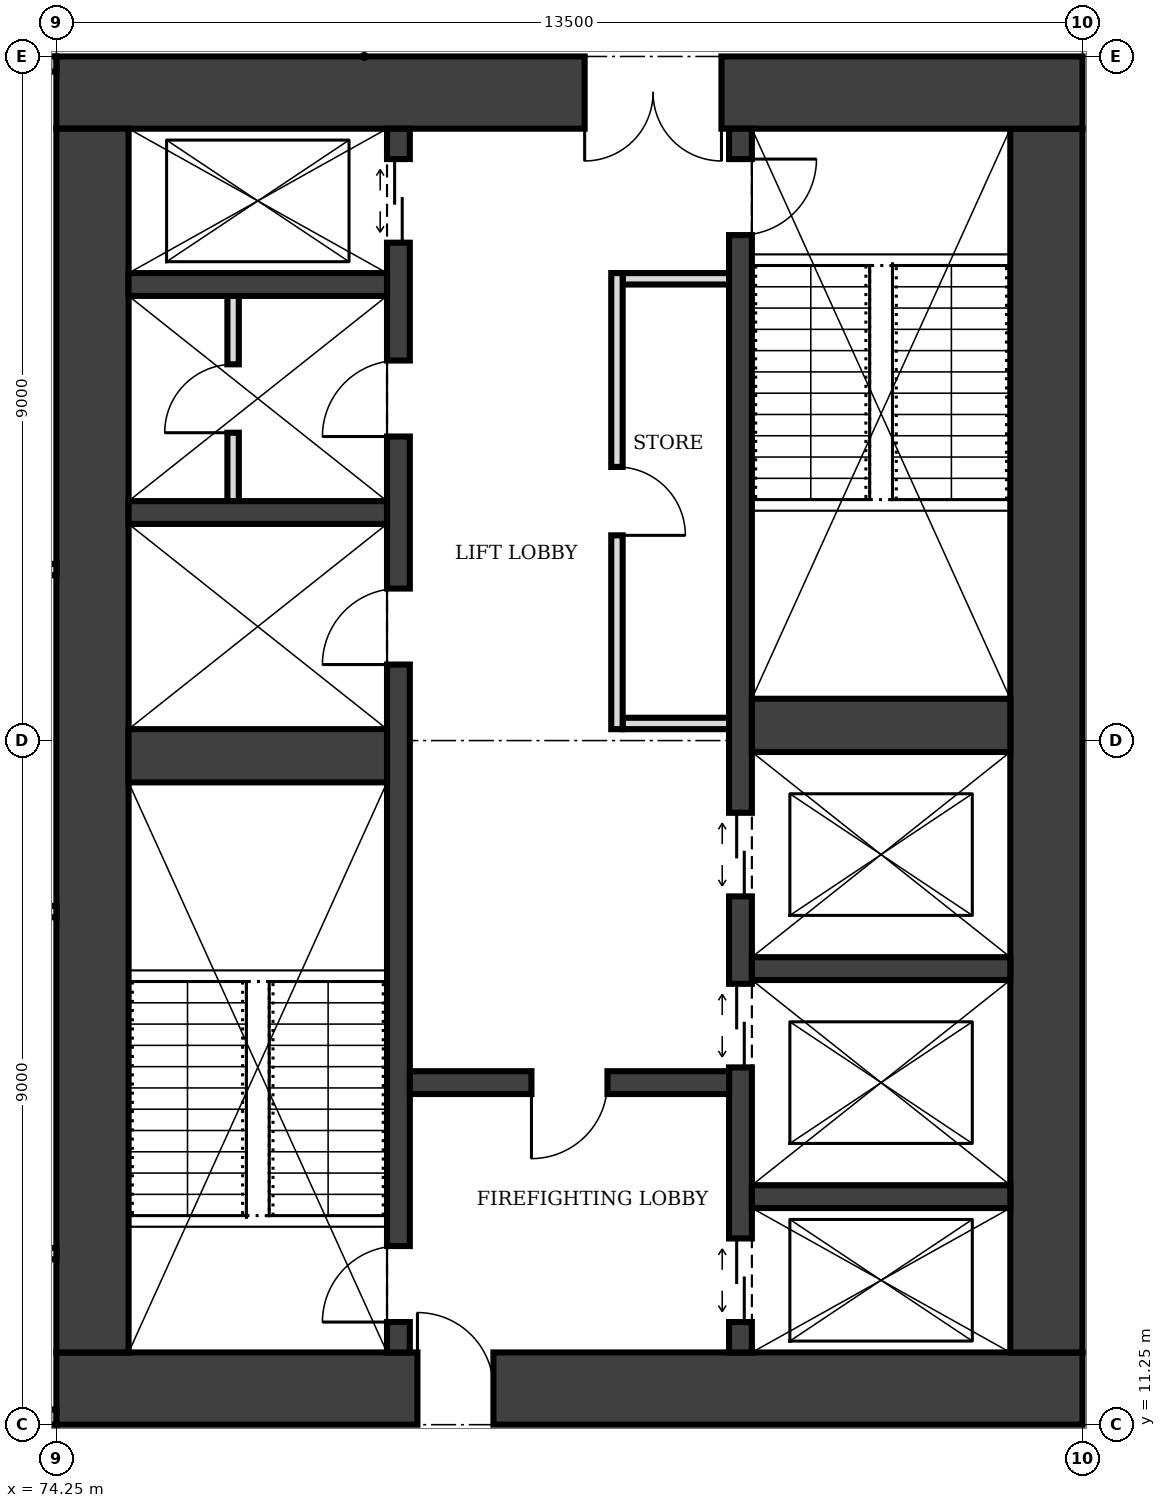
"""IFC4 building model, lengths in metres.
Left out: names, types, materials, properties, quantities, classifications, styles, units other than length and angle.
Written with IfcOpenShell. Run it as: python <this file> out.ifc"""

import sys

from ifc_helpers import new_model, si_unit, direction, frame, frame_2d, origin, place, context, subcontext, project, spatial, rectangle, extrude, element, fill, save


model = new_model("IFC4")
c1 = context("Model", 3, precision=1e-05, world=origin(), true_north=direction((0.0, 1.0)))
c2 = subcontext(c1, "Body", "Model", "MODEL_VIEW")
j1 = project(units=[si_unit("LENGTHUNIT", "METRE"), si_unit("PLANEANGLEUNIT", "RADIAN")], contexts=[c1])
p1 = place(None, origin())
s1 = spatial("IfcSite", under=j1, at=p1, CompositionType="ELEMENT")
p2 = place(p1, origin())
s2 = spatial("IfcBuilding", under=s1, at=p2, CompositionType="ELEMENT")
p3 = place(p2, frame((0.0, 0.0, 157.0)))
s3 = spatial("IfcBuildingStorey", under=s2, at=p3, CompositionType="ELEMENT", Elevation=157.0)
p4 = place(p3, frame((74.25, 11.725, 0.0), z_axis=(0.0, 0.0, 1.0), x_axis=(1.0, 0.0, 0.0)))
e1 = element("IfcWall", 1, at=p4, inside=s3, PredefinedType="SHEAR", context=c2, shape_type="SweptSolid", body=[
    extrude(rectangle(XDim=13.5, YDim=0.95, at=frame_2d((6.75, 0.0))), origin(), (0.0, 0.0, 1.0), 4.0),
])
p5 = place(p4, frame((4.75, 0.0, 0.0)))
e2 = element("IfcOpeningElement", 2, at=p5, cuts=e1, PredefinedType="OPENING", context=c2, shape_type="SweptSolid", body=[
    extrude(rectangle(XDim=1.0, YDim=2.1, at=frame_2d((0.5, 1.05))), frame((0.0, 0.485, 0.0), z_axis=(0.0, -1.0, 0.0), x_axis=(1.0, 0.0, 0.0)), (0.0, 0.0, 1.0), 0.97),
])
p6 = place(p3, frame((87.275, 12.2, 0.0), z_axis=(0.0, 0.0, 1.0), x_axis=(0.0, 1.0, 0.0)))
e3 = element("IfcWall", 3, at=p6, inside=s3, PredefinedType="SHEAR", context=c2, shape_type="SweptSolid", body=[
    extrude(rectangle(XDim=16.1, YDim=0.95, at=frame_2d((8.05, 0.0))), origin(), (0.0, 0.0, 1.0), 4.0),
])
p7 = place(p3, frame((87.75, 28.775, 0.0), z_axis=(0.0, 0.0, 1.0), x_axis=(-1.0, 0.0, 0.0)))
e4 = element("IfcWall", 4, at=p7, inside=s3, PredefinedType="SHEAR", context=c2, shape_type="SweptSolid", body=[
    extrude(rectangle(XDim=13.5, YDim=0.95, at=frame_2d((6.75, 0.0))), origin(), (0.0, 0.0, 1.0), 4.0),
])
p8 = place(p7, frame((4.75, 0.0, 0.0)))
e5 = element("IfcOpeningElement", 5, at=p8, cuts=e4, PredefinedType="OPENING", context=c2, shape_type="SweptSolid", body=[
    extrude(rectangle(XDim=1.8, YDim=2.1, at=frame_2d((0.9, 1.05))), frame((0.0, 0.485, 0.0), z_axis=(0.0, -1.0, 0.0), x_axis=(1.0, 0.0, 0.0)), (0.0, 0.0, 1.0), 0.97),
])
p9 = place(p3, frame((74.725, 28.3, 0.0), z_axis=(0.0, 0.0, 1.0), x_axis=(0.0, -1.0, 0.0)))
e6 = element("IfcWall", 6, at=p9, inside=s3, PredefinedType="SHEAR", context=c2, shape_type="SweptSolid", body=[
    extrude(rectangle(XDim=16.1, YDim=0.95, at=frame_2d((8.05, 0.0))), origin(), (0.0, 0.0, 1.0), 4.0),
])
p10 = place(p3, frame((78.75, 12.2, 0.0), z_axis=(0.0, 0.0, 1.0), x_axis=(0.0, 1.0, 0.0)))
e7 = element("IfcWall", 7, at=p10, inside=s3, PredefinedType="SHEAR", context=c2, shape_type="SweptSolid", body=[
    extrude(rectangle(XDim=16.1, YDim=0.3, at=frame_2d((8.05, 0.0))), origin(), (0.0, 0.0, 1.0), 4.0),
])
p11 = place(p10, frame((0.4, 0.0, 0.0)))
e8 = element("IfcOpeningElement", 8, at=p11, cuts=e7, PredefinedType="OPENING", context=c2, shape_type="SweptSolid", body=[
    extrude(rectangle(XDim=1.0, YDim=2.1, at=frame_2d((0.5, 1.05))), frame((0.0, 0.16, 0.0), z_axis=(0.0, -1.0, 0.0), x_axis=(1.0, 0.0, 0.0)), (0.0, 0.0, 1.0), 0.32),
])
p12 = place(p10, frame((14.6, 0.0, 0.0)))
e9 = element("IfcOpeningElement", 9, at=p12, cuts=e7, PredefinedType="OPENING", context=c2, shape_type="SweptSolid", body=[
    extrude(rectangle(XDim=1.1, YDim=2.1, at=frame_2d((0.55, 1.05))), frame((0.0, 0.16, 0.0), z_axis=(0.0, -1.0, 0.0), x_axis=(1.0, 0.0, 0.0)), (0.0, 0.0, 1.0), 0.32),
])
p13 = place(p10, frame((9.05, 0.0, 0.0)))
e10 = element("IfcOpeningElement", 10, at=p13, cuts=e7, PredefinedType="OPENING", context=c2, shape_type="SweptSolid", body=[
    extrude(rectangle(XDim=1.0, YDim=2.1, at=frame_2d((0.5, 1.05))), frame((0.0, 0.16, 0.0), z_axis=(0.0, -1.0, 0.0), x_axis=(1.0, 0.0, 0.0)), (0.0, 0.0, 1.0), 0.32),
])
p14 = place(p10, frame((12.05, 0.0, 0.0)))
e11 = element("IfcOpeningElement", 11, at=p14, cuts=e7, PredefinedType="OPENING", context=c2, shape_type="SweptSolid", body=[
    extrude(rectangle(XDim=1.0, YDim=2.1, at=frame_2d((0.5, 1.05))), frame((0.0, 0.16, 0.0), z_axis=(0.0, -1.0, 0.0), x_axis=(1.0, 0.0, 0.0)), (0.0, 0.0, 1.0), 0.32),
])
p15 = place(p3, frame((83.25, 12.2, 0.0), z_axis=(0.0, 0.0, 1.0), x_axis=(0.0, 1.0, 0.0)))
e12 = element("IfcWall", 12, at=p15, inside=s3, PredefinedType="SHEAR", context=c2, shape_type="SweptSolid", body=[
    extrude(rectangle(XDim=16.1, YDim=0.3, at=frame_2d((8.05, 0.0))), origin(), (0.0, 0.0, 1.0), 4.0),
])
p16 = place(p15, frame((14.7, 0.0, 0.0)))
e13 = element("IfcOpeningElement", 13, at=p16, cuts=e12, PredefinedType="OPENING", context=c2, shape_type="SweptSolid", body=[
    extrude(rectangle(XDim=1.0, YDim=2.1, at=frame_2d((0.5, 1.05))), frame((0.0, 0.16, 0.0), z_axis=(0.0, -1.0, 0.0), x_axis=(1.0, 0.0, 0.0)), (0.0, 0.0, 1.0), 0.32),
])
p17 = place(p15, frame((0.4, 0.0, 0.0)))
e14 = element("IfcOpeningElement", 14, at=p17, cuts=e12, PredefinedType="OPENING", context=c2, shape_type="SweptSolid", body=[
    extrude(rectangle(XDim=1.1, YDim=2.1, at=frame_2d((0.55, 1.05))), frame((0.0, 0.16, 0.0), z_axis=(0.0, -1.0, 0.0), x_axis=(1.0, 0.0, 0.0)), (0.0, 0.0, 1.0), 0.32),
])
p18 = place(p15, frame((3.75, 0.0, 0.0)))
e15 = element("IfcOpeningElement", 15, at=p18, cuts=e12, PredefinedType="OPENING", context=c2, shape_type="SweptSolid", body=[
    extrude(rectangle(XDim=1.1, YDim=2.1, at=frame_2d((0.55, 1.05))), frame((0.0, 0.16, 0.0), z_axis=(0.0, -1.0, 0.0), x_axis=(1.0, 0.0, 0.0)), (0.0, 0.0, 1.0), 0.32),
])
p19 = place(p15, frame((6.0, 0.0, 0.0)))
e16 = element("IfcOpeningElement", 16, at=p19, cuts=e12, PredefinedType="OPENING", context=c2, shape_type="SweptSolid", body=[
    extrude(rectangle(XDim=1.1, YDim=2.1, at=frame_2d((0.55, 1.05))), frame((0.0, 0.16, 0.0), z_axis=(0.0, -1.0, 0.0), x_axis=(1.0, 0.0, 0.0)), (0.0, 0.0, 1.0), 0.32),
])
p20 = place(p3, frame((75.2, 20.05, 0.0), z_axis=(0.0, 0.0, 1.0), x_axis=(1.0, 0.0, 0.0)))
e17 = element("IfcWall", 17, at=p20, inside=s3, PredefinedType="SHEAR", context=c2, shape_type="SweptSolid", body=[
    extrude(rectangle(XDim=3.4, YDim=0.7, at=frame_2d((1.7, 0.0))), origin(), (0.0, 0.0, 1.0), 4.0),
])
p21 = place(p3, frame((78.9, 15.75, 0.0), z_axis=(0.0, 0.0, 1.0), x_axis=(1.0, 0.0, 0.0)))
e18 = element("IfcWall", 18, at=p21, inside=s3, PredefinedType="SHEAR", context=c2, shape_type="SweptSolid", body=[
    extrude(rectangle(XDim=4.2, YDim=0.3, at=frame_2d((2.1, 0.0))), origin(), (0.0, 0.0, 1.0), 4.0),
])
p22 = place(p21, frame((1.6, 0.0, 0.0)))
e19 = element("IfcOpeningElement", 19, at=p22, cuts=e18, PredefinedType="OPENING", context=c2, shape_type="SweptSolid", body=[
    extrude(rectangle(XDim=1.0, YDim=2.1, at=frame_2d((0.5, 1.05))), frame((0.0, 0.16, 0.0), z_axis=(0.0, -1.0, 0.0), x_axis=(1.0, 0.0, 0.0)), (0.0, 0.0, 1.0), 0.32),
])
for number, where, z_axis, x_axis in (
    (20, (83.4, 14.25, 0.0), (0.0, 0.0, 1.0), (1.0, 0.0, 0.0)),
    (21, (83.4, 17.25, 0.0), (0.0, 0.0, 1.0), (1.0, 0.0, 0.0)),
):
    element("IfcWall", number, at=place(p3, frame(where, z_axis=z_axis, x_axis=x_axis)), inside=s3, PredefinedType="SHEAR", context=c2, shape_type="SweptSolid", body=[
        extrude(rectangle(XDim=3.4, YDim=0.3, at=frame_2d((1.7, 0.0))), origin(), (0.0, 0.0, 1.0), 4.0),
    ])
p23 = place(p3, frame((83.4, 20.45, 0.0), z_axis=(0.0, 0.0, 1.0), x_axis=(1.0, 0.0, 0.0)))
e22 = element("IfcWall", 22, at=p23, inside=s3, PredefinedType="SHEAR", context=c2, shape_type="SweptSolid", body=[
    extrude(rectangle(XDim=3.4, YDim=0.7, at=frame_2d((1.7, 0.0))), origin(), (0.0, 0.0, 1.0), 4.0),
])
for number, where, z_axis, x_axis in (
    (23, (75.2, 23.25, 0.0), (0.0, 0.0, 1.0), (1.0, 0.0, 0.0)),
    (24, (75.2, 26.25, 0.0), (0.0, 0.0, 1.0), (1.0, 0.0, 0.0)),
):
    element("IfcWall", number, at=place(p3, frame(where, z_axis=z_axis, x_axis=x_axis)), inside=s3, PredefinedType="SHEAR", context=c2, shape_type="SweptSolid", body=[
        extrude(rectangle(XDim=3.4, YDim=0.3, at=frame_2d((1.7, 0.0))), origin(), (0.0, 0.0, 1.0), 4.0),
    ])
p24 = place(p3, frame((81.625, 20.4, 0.0), z_axis=(0.0, 0.0, 1.0), x_axis=(0.0, 1.0, 0.0)))
e25 = element("IfcWall", 25, at=p24, inside=s3, PredefinedType="PARTITIONING", context=c2, shape_type="SweptSolid", body=[
    extrude(rectangle(XDim=6.0, YDim=0.15, at=frame_2d((3.0, 0.0))), origin(), (0.0, 0.0, 1.0), 3.75),
])
p25 = place(p24, frame((2.55, 0.0, 0.0)))
e26 = element("IfcOpeningElement", 26, at=p25, cuts=e25, PredefinedType="OPENING", context=c2, shape_type="SweptSolid", body=[
    extrude(rectangle(XDim=0.9, YDim=2.1, at=frame_2d((0.45, 1.05))), frame((0.0, 0.085, 0.0), z_axis=(0.0, -1.0, 0.0), x_axis=(1.0, 0.0, 0.0)), (0.0, 0.0, 1.0), 0.17),
])
for number, where, z_axis, x_axis in (
    (27, (81.7, 20.475, 0.0), (0.0, 0.0, 1.0), (1.0, 0.0, 0.0)),
    (28, (81.7, 26.325, 0.0), (0.0, 0.0, 1.0), (1.0, 0.0, 0.0)),
):
    element("IfcWall", number, at=place(p3, frame(where, z_axis=z_axis, x_axis=x_axis)), inside=s3, PredefinedType="PARTITIONING", context=c2, shape_type="SweptSolid", body=[
        extrude(rectangle(XDim=1.4, YDim=0.15, at=frame_2d((0.7, 0.0))), origin(), (0.0, 0.0, 1.0), 3.75),
    ])
p26 = place(p3, frame((76.575, 23.4, 0.0), z_axis=(0.0, 0.0, 1.0), x_axis=(0.0, 1.0, 0.0)))
e29 = element("IfcWall", 29, at=p26, inside=s3, PredefinedType="PARTITIONING", context=c2, shape_type="SweptSolid", body=[
    extrude(rectangle(XDim=2.7, YDim=0.15, at=frame_2d((1.35, 0.0))), origin(), (0.0, 0.0, 1.0), 3.75),
])
p27 = place(p26, frame((0.9, 0.0, 0.0)))
e30 = element("IfcOpeningElement", 30, at=p27, cuts=e29, PredefinedType="OPENING", context=c2, shape_type="SweptSolid", body=[
    extrude(rectangle(XDim=0.9, YDim=2.1, at=frame_2d((0.45, 1.05))), frame((0.0, 0.085, 0.0), z_axis=(0.0, -1.0, 0.0), x_axis=(1.0, 0.0, 0.0)), (0.0, 0.0, 1.0), 0.17),
])
for number, where, z_axis, x_axis in (
    (31, (68.47, 11.35, 0.0), (0.0, 0.0, 1.0), (1.0, 0.0, 0.0)),
    (32, (68.47, 29.15, 0.0), (0.0, 0.0, 1.0), (1.0, 0.0, 0.0)),
):
    element("IfcWall", number, at=place(p3, frame(where, z_axis=z_axis, x_axis=x_axis)), inside=s3, PredefinedType="SOLIDWALL", context=c2, shape_type="SweptSolid", body=[
        extrude(rectangle(XDim=5.78, YDim=0.2, at=frame_2d((2.89, 0.0))), origin(), (0.0, 0.0, 1.0), 2.85),
    ])
for number, where, z_axis, x_axis in (
    (33, (65.15, 13.5, 0.0), (0.0, 0.0, 1.0), (1.0, 0.0, 0.0)),
    (34, (65.15, 18.0, 0.0), (0.0, 0.0, 1.0), (1.0, 0.0, 0.0)),
    (35, (65.15, 22.5, 0.0), (0.0, 0.0, 1.0), (1.0, 0.0, 0.0)),
):
    element("IfcWall", number, at=place(p3, frame(where, z_axis=z_axis, x_axis=x_axis)), inside=s3, PredefinedType="PARTITIONING", context=c2, shape_type="SweptSolid", body=[
        extrude(rectangle(XDim=9.1, YDim=0.15, at=frame_2d((4.55, 0.0))), origin(), (0.0, 0.0, 1.0), 3.75),
    ])
p28 = place(p5, origin())
e36 = element("IfcDoor", 36, at=p28, inside=s3, OperationType="SINGLE_SWING_LEFT", PredefinedType="DOOR", context=c2, shape_type="SweptSolid", body=[
    extrude(rectangle(XDim=1.0, YDim=2.1, at=frame_2d((0.5, 1.05))), frame((0.0, 0.025, 0.0), z_axis=(0.0, -1.0, 0.0), x_axis=(1.0, 0.0, 0.0)), (0.0, 0.0, 1.0), 0.05),
])
fill(e2, e36)
p29 = place(p8, origin())
e37 = element("IfcDoor", 37, at=p29, inside=s3, OperationType="DOUBLE_DOOR_SINGLE_SWING", PredefinedType="DOOR", context=c2, shape_type="SweptSolid", body=[
    extrude(rectangle(XDim=1.8, YDim=2.1, at=frame_2d((0.9, 1.05))), frame((0.0, 0.025, 0.0), z_axis=(0.0, -1.0, 0.0), x_axis=(1.0, 0.0, 0.0)), (0.0, 0.0, 1.0), 0.05),
])
fill(e5, e37)
p30 = place(p22, frame((1.0, 0.0, 0.0), z_axis=(0.0, 0.0, 1.0), x_axis=(-1.0, 0.0, 0.0)))
e38 = element("IfcDoor", 38, at=p30, inside=s3, OperationType="SINGLE_SWING_RIGHT", PredefinedType="DOOR", context=c2, shape_type="SweptSolid", body=[
    extrude(rectangle(XDim=1.0, YDim=2.1, at=frame_2d((0.5, 1.05))), frame((0.0, 0.025, 0.0), z_axis=(0.0, -1.0, 0.0), x_axis=(1.0, 0.0, 0.0)), (0.0, 0.0, 1.0), 0.05),
])
fill(e19, e38)
p31 = place(p11, origin())
e39 = element("IfcDoor", 39, at=p31, inside=s3, OperationType="SINGLE_SWING_LEFT", PredefinedType="DOOR", context=c2, shape_type="SweptSolid", body=[
    extrude(rectangle(XDim=1.0, YDim=2.1, at=frame_2d((0.5, 1.05))), frame((0.0, 0.025, 0.0), z_axis=(0.0, -1.0, 0.0), x_axis=(1.0, 0.0, 0.0)), (0.0, 0.0, 1.0), 0.05),
])
fill(e8, e39)
p32 = place(p16, frame((1.0, 0.0, 0.0), z_axis=(0.0, 0.0, 1.0), x_axis=(-1.0, 0.0, 0.0)))
e40 = element("IfcDoor", 40, at=p32, inside=s3, OperationType="SINGLE_SWING_LEFT", PredefinedType="DOOR", context=c2, shape_type="SweptSolid", body=[
    extrude(rectangle(XDim=1.0, YDim=2.1, at=frame_2d((0.5, 1.05))), frame((0.0, 0.025, 0.0), z_axis=(0.0, -1.0, 0.0), x_axis=(1.0, 0.0, 0.0)), (0.0, 0.0, 1.0), 0.05),
])
fill(e13, e40)
p33 = place(p17, origin())
e41 = element("IfcDoor", 41, at=p33, inside=s3, OperationType="DOUBLE_DOOR_SLIDING", PredefinedType="DOOR", context=c2, shape_type="SweptSolid", body=[
    extrude(rectangle(XDim=1.1, YDim=2.1, at=frame_2d((0.55, 1.05))), frame((0.0, 0.025, 0.0), z_axis=(0.0, -1.0, 0.0), x_axis=(1.0, 0.0, 0.0)), (0.0, 0.0, 1.0), 0.05),
])
fill(e14, e41)
p34 = place(p12, origin())
e42 = element("IfcDoor", 42, at=p34, inside=s3, OperationType="DOUBLE_DOOR_SLIDING", PredefinedType="DOOR", context=c2, shape_type="SweptSolid", body=[
    extrude(rectangle(XDim=1.1, YDim=2.1, at=frame_2d((0.55, 1.05))), frame((0.0, 0.025, 0.0), z_axis=(0.0, -1.0, 0.0), x_axis=(1.0, 0.0, 0.0)), (0.0, 0.0, 1.0), 0.05),
])
fill(e9, e42)
p35 = place(p18, origin())
e43 = element("IfcDoor", 43, at=p35, inside=s3, OperationType="DOUBLE_DOOR_SLIDING", PredefinedType="DOOR", context=c2, shape_type="SweptSolid", body=[
    extrude(rectangle(XDim=1.1, YDim=2.1, at=frame_2d((0.55, 1.05))), frame((0.0, 0.025, 0.0), z_axis=(0.0, -1.0, 0.0), x_axis=(1.0, 0.0, 0.0)), (0.0, 0.0, 1.0), 0.05),
])
fill(e15, e43)
p36 = place(p19, origin())
e44 = element("IfcDoor", 44, at=p36, inside=s3, OperationType="DOUBLE_DOOR_SLIDING", PredefinedType="DOOR", context=c2, shape_type="SweptSolid", body=[
    extrude(rectangle(XDim=1.1, YDim=2.1, at=frame_2d((0.55, 1.05))), frame((0.0, 0.025, 0.0), z_axis=(0.0, -1.0, 0.0), x_axis=(1.0, 0.0, 0.0)), (0.0, 0.0, 1.0), 0.05),
])
fill(e16, e44)
p37 = place(p25, frame((0.9, 0.0, 0.0), z_axis=(0.0, 0.0, 1.0), x_axis=(-1.0, 0.0, 0.0)))
e45 = element("IfcDoor", 45, at=p37, inside=s3, OperationType="SINGLE_SWING_RIGHT", PredefinedType="DOOR", context=c2, shape_type="SweptSolid", body=[
    extrude(rectangle(XDim=0.9, YDim=2.1, at=frame_2d((0.45, 1.05))), frame((0.0, 0.025, 0.0), z_axis=(0.0, -1.0, 0.0), x_axis=(1.0, 0.0, 0.0)), (0.0, 0.0, 1.0), 0.05),
])
fill(e26, e45)
p38 = place(p13, origin())
e46 = element("IfcDoor", 46, at=p38, inside=s3, OperationType="SINGLE_SWING_LEFT", PredefinedType="DOOR", context=c2, shape_type="SweptSolid", body=[
    extrude(rectangle(XDim=1.0, YDim=2.1, at=frame_2d((0.5, 1.05))), frame((0.0, 0.025, 0.0), z_axis=(0.0, -1.0, 0.0), x_axis=(1.0, 0.0, 0.0)), (0.0, 0.0, 1.0), 0.05),
])
fill(e10, e46)
p39 = place(p14, origin())
e47 = element("IfcDoor", 47, at=p39, inside=s3, OperationType="SINGLE_SWING_LEFT", PredefinedType="DOOR", context=c2, shape_type="SweptSolid", body=[
    extrude(rectangle(XDim=1.0, YDim=2.1, at=frame_2d((0.5, 1.05))), frame((0.0, 0.025, 0.0), z_axis=(0.0, -1.0, 0.0), x_axis=(1.0, 0.0, 0.0)), (0.0, 0.0, 1.0), 0.05),
])
fill(e11, e47)
p40 = place(p27, origin())
e48 = element("IfcDoor", 48, at=p40, inside=s3, OperationType="SINGLE_SWING_LEFT", PredefinedType="DOOR", context=c2, shape_type="SweptSolid", body=[
    extrude(rectangle(XDim=0.9, YDim=2.1, at=frame_2d((0.45, 1.05))), frame((0.0, 0.025, 0.0), z_axis=(0.0, -1.0, 0.0), x_axis=(1.0, 0.0, 0.0)), (0.0, 0.0, 1.0), 0.05),
])
fill(e30, e48)
save(model, sys.argv[1])
